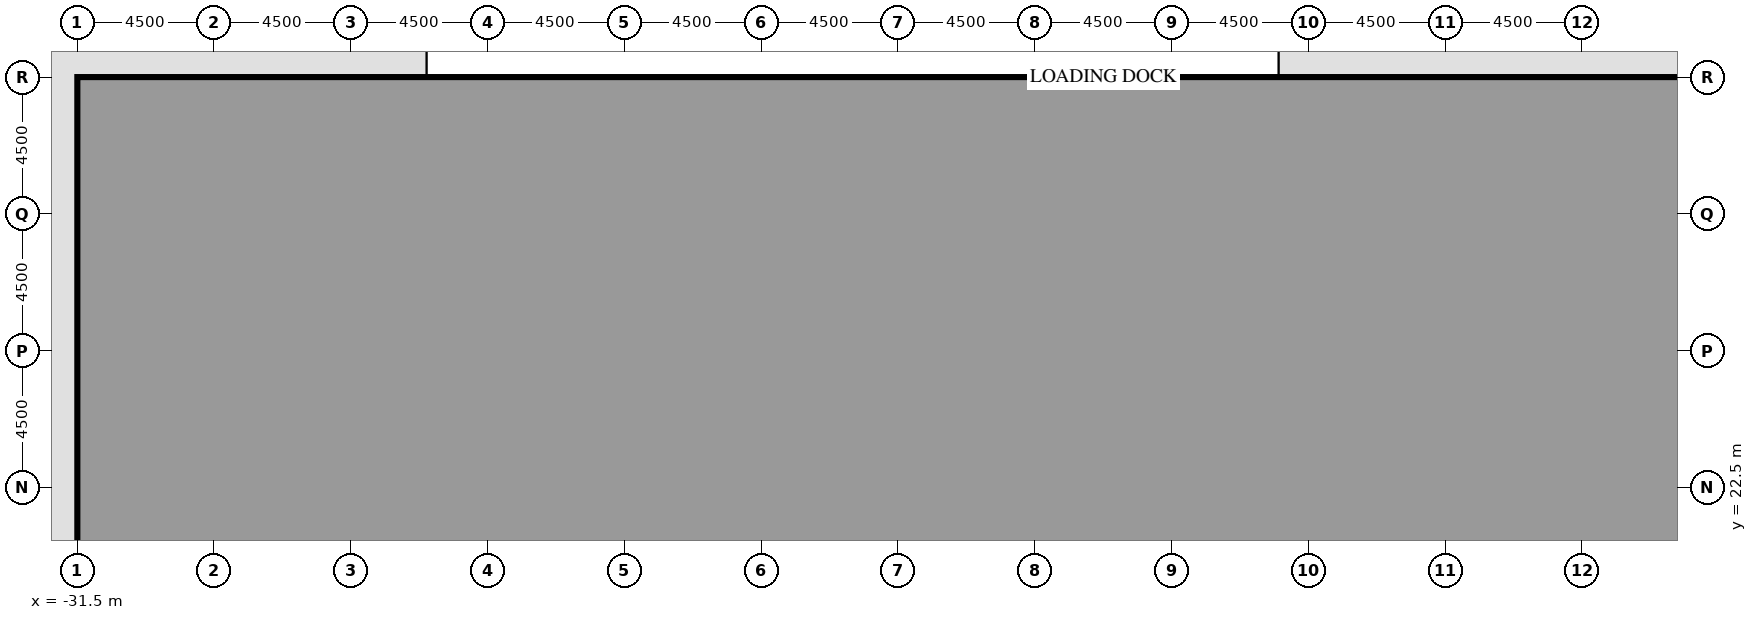
"""IFC4 building model, lengths in metres.
Left out: names, types, materials, properties, quantities, classifications, styles, units other than length and angle.
Written with IfcOpenShell. Run it as: python <this file> out.ifc"""

import sys

from ifc_helpers import new_model, si_unit, direction, frame, frame_2d, origin, origin_2d, place, context, subcontext, project, spatial, rectangle, extrude, element, fill, save


model = new_model("IFC4")
c1 = context("Model", 3, precision=1e-05, world=origin(), true_north=direction((0.0, 1.0)))
c2 = subcontext(c1, "Body", "Model", "MODEL_VIEW")
j1 = project(units=[si_unit("LENGTHUNIT", "METRE"), si_unit("PLANEANGLEUNIT", "RADIAN")], contexts=[c1])
p1 = place(None, origin())
s1 = spatial("IfcSite", under=j1, at=p1, CompositionType="ELEMENT")
p2 = place(p1, origin())
s2 = spatial("IfcBuilding", under=s1, at=p2, CompositionType="ELEMENT")
p3 = place(p2, origin())
s3 = spatial("IfcBuildingStorey", under=s2, at=p3, CompositionType="ELEMENT", Elevation=0.0)
for number, where, z_axis, x_axis in (
    (1, (-31.5, 22.5, 0.0), (0.0, 0.0, 1.0), (1.0, 0.0, 0.0)),
    (2, (-31.5, 27.0, 0.0), (0.0, 0.0, 1.0), (1.0, 0.0, 0.0)),
    (3, (-31.5, 31.5, 0.0), (0.0, 0.0, 1.0), (1.0, 0.0, 0.0)),
    (4, (-27.0, 36.0, 0.0), (0.0, 0.0, 1.0), (1.0, 0.0, 0.0)),
    (5, (-22.5, 36.0, 0.0), (0.0, 0.0, 1.0), (1.0, 0.0, 0.0)),
    (6, (-18.0, 36.0, 0.0), (0.0, 0.0, 1.0), (1.0, 0.0, 0.0)),
    (7, (-13.5, 36.0, 0.0), (0.0, 0.0, 1.0), (1.0, 0.0, 0.0)),
    (8, (-9.0, 36.0, 0.0), (0.0, 0.0, 1.0), (1.0, 0.0, 0.0)),
    (9, (-4.5, 36.0, 0.0), (0.0, 0.0, 1.0), (1.0, 0.0, 0.0)),
    (10, (0.0, 36.0, 0.0), (0.0, 0.0, 1.0), (1.0, 0.0, 0.0)),
    (11, (4.5, 36.0, 0.0), (0.0, 0.0, 1.0), (1.0, 0.0, 0.0)),
    (12, (9.0, 36.0, 0.0), (0.0, 0.0, 1.0), (1.0, 0.0, 0.0)),
    (13, (13.5, 36.0, 0.0), (0.0, 0.0, 1.0), (1.0, 0.0, 0.0)),
    (14, (18.0, 36.0, 0.0), (0.0, 0.0, 1.0), (1.0, 0.0, 0.0)),
):
    element("IfcColumn", number, at=place(p3, frame(where, z_axis=z_axis, x_axis=x_axis)), inside=s3, PredefinedType="COLUMN", context=c2, shape_type="SweptSolid", body=[
        extrude(rectangle(XDim=1.4, YDim=1.4, at=origin_2d()), origin(), (0.0, 0.0, 1.0), 7.2),
    ])
p4 = place(p3, frame((-27.0, 22.5, 0.0), z_axis=(0.0, 0.0, 1.0), x_axis=(1.0, 0.0, 0.0)))
e15 = element("IfcColumn", 15, at=p4, inside=s3, PredefinedType="COLUMN", context=c2, shape_type="SweptSolid", body=[
    extrude(rectangle(XDim=1.6, YDim=1.6, at=origin_2d()), origin(), (0.0, 0.0, 1.0), 6.75),
])
p5 = place(p3, frame((-27.0, 27.0, 0.0), z_axis=(0.0, 0.0, 1.0), x_axis=(1.0, 0.0, 0.0)))
e16 = element("IfcColumn", 16, at=p5, inside=s3, PredefinedType="COLUMN", context=c2, shape_type="SweptSolid", body=[
    extrude(rectangle(XDim=1.6, YDim=1.6, at=origin_2d()), origin(), (0.0, 0.0, 1.0), 4.95),
])
p6 = place(p3, frame((-18.0, 22.5, 0.0), z_axis=(0.0, 0.0, 1.0), x_axis=(1.0, 0.0, 0.0)))
e17 = element("IfcColumn", 17, at=p6, inside=s3, PredefinedType="COLUMN", context=c2, shape_type="SweptSolid", body=[
    extrude(rectangle(XDim=1.6, YDim=1.6, at=origin_2d()), origin(), (0.0, 0.0, 1.0), 7.2),
])
p7 = place(p3, frame((-18.0, 27.0, 0.0), z_axis=(0.0, 0.0, 1.0), x_axis=(1.0, 0.0, 0.0)))
e18 = element("IfcColumn", 18, at=p7, inside=s3, PredefinedType="COLUMN", context=c2, shape_type="SweptSolid", body=[
    extrude(rectangle(XDim=1.6, YDim=1.6, at=origin_2d()), origin(), (0.0, 0.0, 1.0), 6.75),
])
p8 = place(p3, frame((-9.0, 22.5, 0.0), z_axis=(0.0, 0.0, 1.0), x_axis=(1.0, 0.0, 0.0)))
e19 = element("IfcColumn", 19, at=p8, inside=s3, PredefinedType="COLUMN", context=c2, shape_type="SweptSolid", body=[
    extrude(rectangle(XDim=1.6, YDim=1.6, at=origin_2d()), origin(), (0.0, 0.0, 1.0), 7.2),
])
p9 = place(p3, frame((-9.0, 27.0, 0.0), z_axis=(0.0, 0.0, 1.0), x_axis=(1.0, 0.0, 0.0)))
e20 = element("IfcColumn", 20, at=p9, inside=s3, PredefinedType="COLUMN", context=c2, shape_type="SweptSolid", body=[
    extrude(rectangle(XDim=1.6, YDim=1.6, at=origin_2d()), origin(), (0.0, 0.0, 1.0), 6.75),
])
p10 = place(p3, frame((0.0, 22.5, 0.0), z_axis=(0.0, 0.0, 1.0), x_axis=(1.0, 0.0, 0.0)))
e21 = element("IfcColumn", 21, at=p10, inside=s3, PredefinedType="COLUMN", context=c2, shape_type="SweptSolid", body=[
    extrude(rectangle(XDim=1.6, YDim=1.6, at=origin_2d()), origin(), (0.0, 0.0, 1.0), 7.2),
])
p11 = place(p3, frame((0.0, 27.0, 0.0), z_axis=(0.0, 0.0, 1.0), x_axis=(1.0, 0.0, 0.0)))
e22 = element("IfcColumn", 22, at=p11, inside=s3, PredefinedType="COLUMN", context=c2, shape_type="SweptSolid", body=[
    extrude(rectangle(XDim=1.6, YDim=1.6, at=origin_2d()), origin(), (0.0, 0.0, 1.0), 6.75),
])
p12 = place(p3, frame((9.0, 22.5, 0.0), z_axis=(0.0, 0.0, 1.0), x_axis=(1.0, 0.0, 0.0)))
e23 = element("IfcColumn", 23, at=p12, inside=s3, PredefinedType="COLUMN", context=c2, shape_type="SweptSolid", body=[
    extrude(rectangle(XDim=1.6, YDim=1.6, at=origin_2d()), origin(), (0.0, 0.0, 1.0), 7.2),
])
p13 = place(p3, frame((9.0, 27.0, 0.0), z_axis=(0.0, 0.0, 1.0), x_axis=(1.0, 0.0, 0.0)))
e24 = element("IfcColumn", 24, at=p13, inside=s3, PredefinedType="COLUMN", context=c2, shape_type="SweptSolid", body=[
    extrude(rectangle(XDim=1.6, YDim=1.6, at=origin_2d()), origin(), (0.0, 0.0, 1.0), 6.75),
])
p14 = place(p3, frame((18.0, 22.5, 0.0), z_axis=(0.0, 0.0, 1.0), x_axis=(1.0, 0.0, 0.0)))
e25 = element("IfcColumn", 25, at=p14, inside=s3, PredefinedType="COLUMN", context=c2, shape_type="SweptSolid", body=[
    extrude(rectangle(XDim=1.6, YDim=1.6, at=origin_2d()), origin(), (0.0, 0.0, 1.0), 7.2),
])
p15 = place(p3, frame((18.0, 27.0, 0.0), z_axis=(0.0, 0.0, 1.0), x_axis=(1.0, 0.0, 0.0)))
e26 = element("IfcColumn", 26, at=p15, inside=s3, PredefinedType="COLUMN", context=c2, shape_type="SweptSolid", body=[
    extrude(rectangle(XDim=1.6, YDim=1.6, at=origin_2d()), origin(), (0.0, 0.0, 1.0), 6.75),
])
p16 = place(p3, frame((18.7, 36.0, 0.0), z_axis=(0.0, 0.0, 1.0), x_axis=(1.0, 0.0, 0.0)))
e27 = element("IfcWall", 27, at=p16, inside=s3, PredefinedType="SOLIDWALL", context=c2, shape_type="SweptSolid", body=[
    extrude(rectangle(XDim=3.1, YDim=0.35, at=frame_2d((1.55, 0.0))), origin(), (0.0, 0.0, 1.0), 5.85),
])
p17 = place(p3, frame((14.2, 36.0, 0.0), z_axis=(0.0, 0.0, 1.0), x_axis=(1.0, 0.0, 0.0)))
e28 = element("IfcWall", 28, at=p17, inside=s3, PredefinedType="SOLIDWALL", context=c2, shape_type="SweptSolid", body=[
    extrude(rectangle(XDim=3.1, YDim=0.35, at=frame_2d((1.55, 0.0))), origin(), (0.0, 0.0, 1.0), 5.85),
])
p18 = place(p17, frame((0.95, 0.0, 0.0)))
e29 = element("IfcOpeningElement", 29, at=p18, cuts=e28, PredefinedType="OPENING", context=c2, shape_type="SweptSolid", body=[
    extrude(rectangle(XDim=1.2, YDim=2.2, at=frame_2d((0.6, 1.1))), frame((0.0, 0.185, 0.0), z_axis=(0.0, -1.0, 0.0), x_axis=(1.0, 0.0, 0.0)), (0.0, 0.0, 1.0), 0.37),
])
p19 = place(p3, frame((9.7, 36.0, 0.0), z_axis=(0.0, 0.0, 1.0), x_axis=(1.0, 0.0, 0.0)))
e30 = element("IfcWall", 30, at=p19, inside=s3, PredefinedType="SOLIDWALL", context=c2, shape_type="SweptSolid", body=[
    extrude(rectangle(XDim=3.1, YDim=0.35, at=frame_2d((1.55, 0.0))), origin(), (0.0, 0.0, 1.0), 5.85),
])
p20 = place(p3, frame((5.2, 36.0, 0.0), z_axis=(0.0, 0.0, 1.0), x_axis=(1.0, 0.0, 0.0)))
e31 = element("IfcWall", 31, at=p20, inside=s3, PredefinedType="SOLIDWALL", context=c2, shape_type="SweptSolid", body=[
    extrude(rectangle(XDim=3.1, YDim=0.35, at=frame_2d((1.55, 0.0))), origin(), (0.0, 0.0, 1.0), 5.85),
])
p21 = place(p20, frame((0.05, 0.0, 0.0)))
e32 = element("IfcOpeningElement", 32, at=p21, cuts=e31, PredefinedType="OPENING", context=c2, shape_type="SweptSolid", body=[
    extrude(rectangle(XDim=3.0, YDim=4.0, at=frame_2d((1.5, 2.0))), frame((0.0, 0.185, 0.0), z_axis=(0.0, -1.0, 0.0), x_axis=(1.0, 0.0, 0.0)), (0.0, 0.0, 1.0), 0.37),
])
p22 = place(p3, frame((0.7, 36.0, 0.0), z_axis=(0.0, 0.0, 1.0), x_axis=(1.0, 0.0, 0.0)))
e33 = element("IfcWall", 33, at=p22, inside=s3, PredefinedType="SOLIDWALL", context=c2, shape_type="SweptSolid", body=[
    extrude(rectangle(XDim=3.1, YDim=0.35, at=frame_2d((1.55, 0.0))), origin(), (0.0, 0.0, 1.0), 5.85),
])
p23 = place(p3, frame((-3.8, 36.0, 0.0), z_axis=(0.0, 0.0, 1.0), x_axis=(1.0, 0.0, 0.0)))
e34 = element("IfcWall", 34, at=p23, inside=s3, PredefinedType="SOLIDWALL", context=c2, shape_type="SweptSolid", body=[
    extrude(rectangle(XDim=3.1, YDim=0.35, at=frame_2d((1.55, 0.0))), origin(), (0.0, 0.0, 1.0), 5.85),
])
p24 = place(p23, frame((0.05, 0.0, 0.0)))
e35 = element("IfcOpeningElement", 35, at=p24, cuts=e34, PredefinedType="OPENING", context=c2, shape_type="SweptSolid", body=[
    extrude(rectangle(XDim=3.0, YDim=4.0, at=frame_2d((1.5, 2.0))), frame((0.0, 0.185, 0.0), z_axis=(0.0, -1.0, 0.0), x_axis=(1.0, 0.0, 0.0)), (0.0, 0.0, 1.0), 0.37),
])
p25 = place(p3, frame((-8.3, 36.0, 0.0), z_axis=(0.0, 0.0, 1.0), x_axis=(1.0, 0.0, 0.0)))
e36 = element("IfcWall", 36, at=p25, inside=s3, PredefinedType="SOLIDWALL", context=c2, shape_type="SweptSolid", body=[
    extrude(rectangle(XDim=3.1, YDim=0.35, at=frame_2d((1.55, 0.0))), origin(), (0.0, 0.0, 1.0), 5.85),
])
p26 = place(p3, frame((-12.8, 36.0, 0.0), z_axis=(0.0, 0.0, 1.0), x_axis=(1.0, 0.0, 0.0)))
e37 = element("IfcWall", 37, at=p26, inside=s3, PredefinedType="SOLIDWALL", context=c2, shape_type="SweptSolid", body=[
    extrude(rectangle(XDim=3.1, YDim=0.35, at=frame_2d((1.55, 0.0))), origin(), (0.0, 0.0, 1.0), 5.85),
])
p27 = place(p26, frame((0.95, 0.0, 0.0)))
e38 = element("IfcOpeningElement", 38, at=p27, cuts=e37, PredefinedType="OPENING", context=c2, shape_type="SweptSolid", body=[
    extrude(rectangle(XDim=1.2, YDim=2.2, at=frame_2d((0.6, 1.1))), frame((0.0, 0.185, 0.0), z_axis=(0.0, -1.0, 0.0), x_axis=(1.0, 0.0, 0.0)), (0.0, 0.0, 1.0), 0.37),
])
for number, where, z_axis, x_axis in (
    (39, (-17.3, 36.0, 0.0), (0.0, 0.0, 1.0), (1.0, 0.0, 0.0)),
    (40, (-21.8, 36.0, 0.0), (0.0, 0.0, 1.0), (1.0, 0.0, 0.0)),
    (41, (-26.3, 36.0, 0.0), (0.0, 0.0, 1.0), (1.0, 0.0, 0.0)),
):
    element("IfcWall", number, at=place(p3, frame(where, z_axis=z_axis, x_axis=x_axis)), inside=s3, PredefinedType="SOLIDWALL", context=c2, shape_type="SweptSolid", body=[
        extrude(rectangle(XDim=3.1, YDim=0.35, at=frame_2d((1.55, 0.0))), origin(), (0.0, 0.0, 1.0), 5.85),
    ])
p28 = place(p3, frame((-30.924, 32.076, 0.0), z_axis=(0.0, 0.0, 1.0), x_axis=(0.707106781187, 0.707106781187, 0.0)))
e42 = element("IfcWall", 42, at=p28, inside=s3, PredefinedType="SOLIDWALL", context=c2, shape_type="SweptSolid", body=[
    extrude(rectangle(XDim=4.734, YDim=0.35, at=frame_2d((2.367, 0.0))), origin(), (0.0, 0.0, 1.0), 5.85),
])
for number, where, z_axis, x_axis in (
    (43, (-31.5, 27.7, 0.0), (0.0, 0.0, 1.0), (0.0, 1.0, 0.0)),
    (44, (-31.5, 23.2, 0.0), (0.0, 0.0, 1.0), (0.0, 1.0, 0.0)),
    (45, (-31.5, 18.7, 0.0), (0.0, 0.0, 1.0), (0.0, 1.0, 0.0)),
):
    element("IfcWall", number, at=place(p3, frame(where, z_axis=z_axis, x_axis=x_axis)), inside=s3, PredefinedType="SOLIDWALL", context=c2, shape_type="SweptSolid", body=[
        extrude(rectangle(XDim=3.1, YDim=0.35, at=frame_2d((1.55, 0.0))), origin(), (0.0, 0.0, 1.0), 5.85),
    ])
p29 = place(p3, frame((-26.15, 21.7, 0.0), z_axis=(0.0, 0.0, 1.0), x_axis=(1.0, 0.0, 0.0)))
e46 = element("IfcWall", 46, at=p29, inside=s3, PredefinedType="PARTITIONING", context=c2, shape_type="SweptSolid", body=[
    extrude(rectangle(XDim=3.65, YDim=0.15, at=frame_2d((1.825, 0.0))), origin(), (0.0, 0.0, 1.0), 6.75),
])
p30 = place(p29, frame((1.325, 0.0, 0.0)))
e47 = element("IfcOpeningElement", 47, at=p30, cuts=e46, PredefinedType="OPENING", context=c2, shape_type="SweptSolid", body=[
    extrude(rectangle(XDim=1.0, YDim=2.1, at=frame_2d((0.5, 1.05))), frame((0.0, 0.085, 0.0), z_axis=(0.0, -1.0, 0.0), x_axis=(1.0, 0.0, 0.0)), (0.0, 0.0, 1.0), 0.17),
])
p31 = place(p3, frame((-31.325, 21.7, 0.0), z_axis=(0.0, 0.0, 1.0), x_axis=(1.0, 0.0, 0.0)))
e48 = element("IfcWall", 48, at=p31, inside=s3, PredefinedType="PARTITIONING", context=c2, shape_type="SweptSolid", body=[
    extrude(rectangle(XDim=3.475, YDim=0.15, at=frame_2d((1.737, 0.0))), origin(), (0.0, 0.0, 1.0), 6.75),
])
p32 = place(p3, frame((-17.15, 21.7, 0.0), z_axis=(0.0, 0.0, 1.0), x_axis=(1.0, 0.0, 0.0)))
e49 = element("IfcWall", 49, at=p32, inside=s3, PredefinedType="PARTITIONING", context=c2, shape_type="SweptSolid", body=[
    extrude(rectangle(XDim=7.3, YDim=0.15, at=frame_2d((3.65, 0.0))), origin(), (0.0, 0.0, 1.0), 6.75),
])
p33 = place(p32, frame((3.15, 0.0, 0.0)))
e50 = element("IfcOpeningElement", 50, at=p33, cuts=e49, PredefinedType="OPENING", context=c2, shape_type="SweptSolid", body=[
    extrude(rectangle(XDim=1.0, YDim=2.1, at=frame_2d((0.5, 1.05))), frame((0.0, 0.085, 0.0), z_axis=(0.0, -1.0, 0.0), x_axis=(1.0, 0.0, 0.0)), (0.0, 0.0, 1.0), 0.17),
])
p34 = place(p3, frame((-22.5, 21.7, 0.0), z_axis=(0.0, 0.0, 1.0), x_axis=(1.0, 0.0, 0.0)))
e51 = element("IfcWall", 51, at=p34, inside=s3, PredefinedType="PARTITIONING", context=c2, shape_type="SweptSolid", body=[
    extrude(rectangle(XDim=3.65, YDim=0.15, at=frame_2d((1.825, 0.0))), origin(), (0.0, 0.0, 1.0), 6.75),
])
p35 = place(p3, frame((0.85, 21.7, 0.0), z_axis=(0.0, 0.0, 1.0), x_axis=(1.0, 0.0, 0.0)))
e52 = element("IfcWall", 52, at=p35, inside=s3, PredefinedType="PARTITIONING", context=c2, shape_type="SweptSolid", body=[
    extrude(rectangle(XDim=7.3, YDim=0.15, at=frame_2d((3.65, 0.0))), origin(), (0.0, 0.0, 1.0), 6.75),
])
p36 = place(p35, frame((2.75, 0.0, 0.0)))
e53 = element("IfcOpeningElement", 53, at=p36, cuts=e52, PredefinedType="OPENING", context=c2, shape_type="SweptSolid", body=[
    extrude(rectangle(XDim=1.8, YDim=2.1, at=frame_2d((0.9, 1.05))), frame((0.0, 0.085, 0.0), z_axis=(0.0, -1.0, 0.0), x_axis=(1.0, 0.0, 0.0)), (0.0, 0.0, 1.0), 0.17),
])
p37 = place(p3, frame((-8.15, 21.7, 0.0), z_axis=(0.0, 0.0, 1.0), x_axis=(1.0, 0.0, 0.0)))
e54 = element("IfcWall", 54, at=p37, inside=s3, PredefinedType="PARTITIONING", context=c2, shape_type="SweptSolid", body=[
    extrude(rectangle(XDim=7.3, YDim=0.15, at=frame_2d((3.65, 0.0))), origin(), (0.0, 0.0, 1.0), 6.75),
])
p38 = place(p3, frame((18.85, 21.7, 0.0), z_axis=(0.0, 0.0, 1.0), x_axis=(1.0, 0.0, 0.0)))
e55 = element("IfcWall", 55, at=p38, inside=s3, PredefinedType="PARTITIONING", context=c2, shape_type="SweptSolid", body=[
    extrude(rectangle(XDim=1.35, YDim=0.15, at=frame_2d((0.675, 0.0))), origin(), (0.0, 0.0, 1.0), 6.75),
])
p39 = place(p3, frame((9.85, 21.7, 0.0), z_axis=(0.0, 0.0, 1.0), x_axis=(1.0, 0.0, 0.0)))
e56 = element("IfcWall", 56, at=p39, inside=s3, PredefinedType="PARTITIONING", context=c2, shape_type="SweptSolid", body=[
    extrude(rectangle(XDim=7.3, YDim=0.15, at=frame_2d((3.65, 0.0))), origin(), (0.0, 0.0, 1.0), 6.75),
])
p40 = place(p39, frame((2.75, 0.0, 0.0)))
e57 = element("IfcOpeningElement", 57, at=p40, cuts=e56, PredefinedType="OPENING", context=c2, shape_type="SweptSolid", body=[
    extrude(rectangle(XDim=1.8, YDim=2.1, at=frame_2d((0.9, 1.05))), frame((0.0, 0.085, 0.0), z_axis=(0.0, -1.0, 0.0), x_axis=(1.0, 0.0, 0.0)), (0.0, 0.0, 1.0), 0.17),
])
p41 = place(p3, frame((20.2, 21.7, 0.0), z_axis=(0.0, 0.0, 1.0), x_axis=(1.0, 0.0, 0.0)))
e58 = element("IfcWall", 58, at=p41, inside=s3, PredefinedType="PARTITIONING", context=c2, shape_type="SweptSolid", body=[
    extrude(rectangle(XDim=1.45, YDim=0.15, at=frame_2d((0.725, 0.0))), origin(), (0.0, 0.0, 1.0), 6.75),
])
p42 = place(p3, frame((-22.5, 21.7, 0.0), z_axis=(0.0, 0.0, 1.0), x_axis=(0.0, 1.0, 0.0)))
e59 = element("IfcWall", 59, at=p42, inside=s3, PredefinedType="PARTITIONING", context=c2, shape_type="SweptSolid", body=[
    extrude(rectangle(XDim=13.55, YDim=0.15, at=frame_2d((6.775, 0.0))), origin(), (0.0, 0.0, 1.0), 6.75),
])
p43 = place(p3, frame((-9.0, 23.35, 0.0), z_axis=(0.0, 0.0, 1.0), x_axis=(0.0, 1.0, 0.0)))
e60 = element("IfcWall", 60, at=p43, inside=s3, PredefinedType="PARTITIONING", context=c2, shape_type="SweptSolid", body=[
    extrude(rectangle(XDim=2.8, YDim=0.15, at=frame_2d((1.4, 0.0))), origin(), (0.0, 0.0, 1.0), 6.75),
])
p44 = place(p3, frame((-9.0, 27.85, 0.0), z_axis=(0.0, 0.0, 1.0), x_axis=(0.0, 1.0, 0.0)))
e61 = element("IfcWall", 61, at=p44, inside=s3, PredefinedType="PARTITIONING", context=c2, shape_type="SweptSolid", body=[
    extrude(rectangle(XDim=7.4, YDim=0.15, at=frame_2d((3.7, 0.0))), origin(), (0.0, 0.0, 1.0), 6.75),
])
p45 = place(p3, frame((9.0, 23.35, 0.0), z_axis=(0.0, 0.0, 1.0), x_axis=(0.0, 1.0, 0.0)))
e62 = element("IfcWall", 62, at=p45, inside=s3, PredefinedType="PARTITIONING", context=c2, shape_type="SweptSolid", body=[
    extrude(rectangle(XDim=2.8, YDim=0.15, at=frame_2d((1.4, 0.0))), origin(), (0.0, 0.0, 1.0), 6.75),
])
p46 = place(p3, frame((9.0, 27.85, 0.0), z_axis=(0.0, 0.0, 1.0), x_axis=(0.0, 1.0, 0.0)))
e63 = element("IfcWall", 63, at=p46, inside=s3, PredefinedType="PARTITIONING", context=c2, shape_type="SweptSolid", body=[
    extrude(rectangle(XDim=7.4, YDim=0.15, at=frame_2d((3.7, 0.0))), origin(), (0.0, 0.0, 1.0), 6.75),
])
p47 = place(p3, frame((20.2, 21.7, 0.0), z_axis=(0.0, 0.0, 1.0), x_axis=(0.0, 1.0, 0.0)))
e64 = element("IfcWall", 64, at=p47, inside=s3, PredefinedType="PARTITIONING", context=c2, shape_type="SweptSolid", body=[
    extrude(rectangle(XDim=14.125, YDim=0.15, at=frame_2d((7.062, 0.0))), origin(), (0.0, 0.0, 1.0), 6.75),
])
p48 = place(p18, origin())
e65 = element("IfcDoor", 65, at=p48, inside=s3, OperationType="SINGLE_SWING_LEFT", PredefinedType="DOOR", context=c2, shape_type="SweptSolid", body=[
    extrude(rectangle(XDim=1.2, YDim=2.2, at=frame_2d((0.6, 1.1))), frame((0.0, 0.025, 0.0), z_axis=(0.0, -1.0, 0.0), x_axis=(1.0, 0.0, 0.0)), (0.0, 0.0, 1.0), 0.05),
])
fill(e29, e65)
p49 = place(p21, origin())
e66 = element("IfcDoor", 66, at=p49, inside=s3, OperationType="SINGLE_SWING_LEFT", PredefinedType="DOOR", context=c2, shape_type="SweptSolid", body=[
    extrude(rectangle(XDim=3.0, YDim=4.0, at=frame_2d((1.5, 2.0))), frame((0.0, 0.025, 0.0), z_axis=(0.0, -1.0, 0.0), x_axis=(1.0, 0.0, 0.0)), (0.0, 0.0, 1.0), 0.05),
])
fill(e32, e66)
p50 = place(p24, origin())
e67 = element("IfcDoor", 67, at=p50, inside=s3, OperationType="SINGLE_SWING_LEFT", PredefinedType="DOOR", context=c2, shape_type="SweptSolid", body=[
    extrude(rectangle(XDim=3.0, YDim=4.0, at=frame_2d((1.5, 2.0))), frame((0.0, 0.025, 0.0), z_axis=(0.0, -1.0, 0.0), x_axis=(1.0, 0.0, 0.0)), (0.0, 0.0, 1.0), 0.05),
])
fill(e35, e67)
p51 = place(p27, origin())
e68 = element("IfcDoor", 68, at=p51, inside=s3, OperationType="SINGLE_SWING_LEFT", PredefinedType="DOOR", context=c2, shape_type="SweptSolid", body=[
    extrude(rectangle(XDim=1.2, YDim=2.2, at=frame_2d((0.6, 1.1))), frame((0.0, 0.025, 0.0), z_axis=(0.0, -1.0, 0.0), x_axis=(1.0, 0.0, 0.0)), (0.0, 0.0, 1.0), 0.05),
])
fill(e38, e68)
p52 = place(p30, origin())
e69 = element("IfcDoor", 69, at=p52, inside=s3, OperationType="SINGLE_SWING_RIGHT", PredefinedType="DOOR", context=c2, shape_type="SweptSolid", body=[
    extrude(rectangle(XDim=1.0, YDim=2.1, at=frame_2d((0.5, 1.05))), frame((0.0, 0.025, 0.0), z_axis=(0.0, -1.0, 0.0), x_axis=(1.0, 0.0, 0.0)), (0.0, 0.0, 1.0), 0.05),
])
fill(e47, e69)
p53 = place(p33, origin())
e70 = element("IfcDoor", 70, at=p53, inside=s3, OperationType="SINGLE_SWING_LEFT", PredefinedType="DOOR", context=c2, shape_type="SweptSolid", body=[
    extrude(rectangle(XDim=1.0, YDim=2.1, at=frame_2d((0.5, 1.05))), frame((0.0, 0.025, 0.0), z_axis=(0.0, -1.0, 0.0), x_axis=(1.0, 0.0, 0.0)), (0.0, 0.0, 1.0), 0.05),
])
fill(e50, e70)
p54 = place(p36, origin())
e71 = element("IfcDoor", 71, at=p54, inside=s3, OperationType="DOUBLE_DOOR_DOUBLE_SWING", PredefinedType="DOOR", context=c2, shape_type="SweptSolid", body=[
    extrude(rectangle(XDim=1.8, YDim=2.1, at=frame_2d((0.9, 1.05))), frame((0.0, 0.025, 0.0), z_axis=(0.0, -1.0, 0.0), x_axis=(1.0, 0.0, 0.0)), (0.0, 0.0, 1.0), 0.05),
])
fill(e53, e71)
p55 = place(p40, origin())
e72 = element("IfcDoor", 72, at=p55, inside=s3, OperationType="DOUBLE_DOOR_DOUBLE_SWING", PredefinedType="DOOR", context=c2, shape_type="SweptSolid", body=[
    extrude(rectangle(XDim=1.8, YDim=2.1, at=frame_2d((0.9, 1.05))), frame((0.0, 0.025, 0.0), z_axis=(0.0, -1.0, 0.0), x_axis=(1.0, 0.0, 0.0)), (0.0, 0.0, 1.0), 0.05),
])
fill(e57, e72)
save(model, sys.argv[1])
